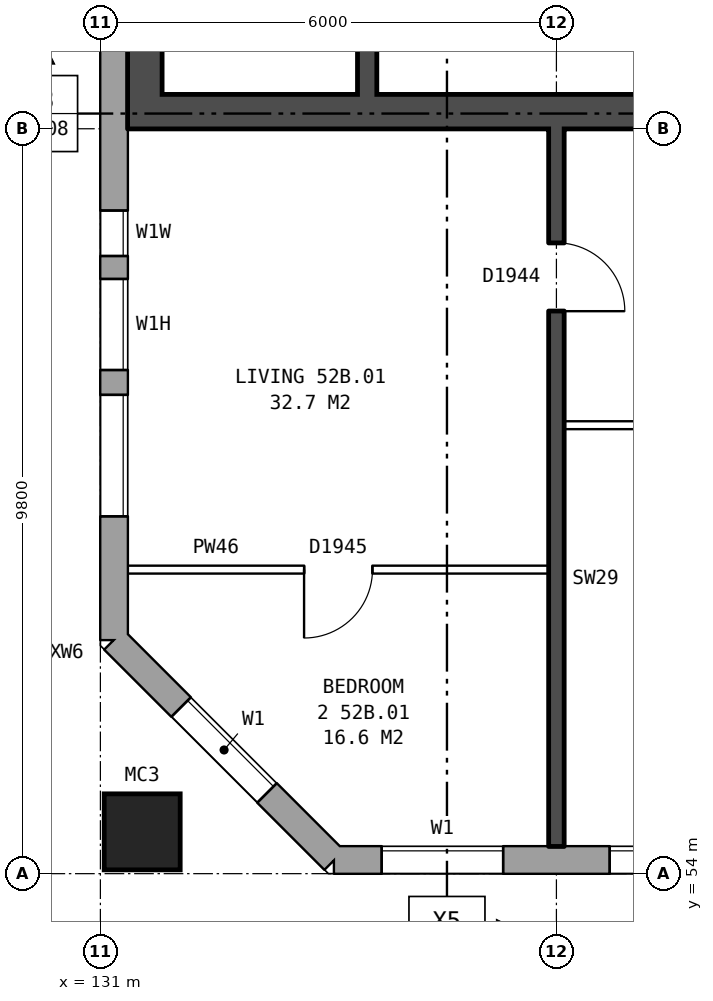
"""IFC4 building model, lengths in metres.
Left out: names, types, materials, properties, quantities, classifications, styles, units other than length and angle.
Written with IfcOpenShell. Run it as: python <this file> out.ifc"""

import sys

from ifc_helpers import new_model, si_unit, direction, frame, frame_2d, origin, origin_2d, place, context, subcontext, project, spatial, rectangle, hollow_rectangle, extrude, element, fill, save


model = new_model("IFC4")
c1 = context("Model", 3, precision=1e-05, world=origin(), true_north=direction((0.0, 1.0)))
c2 = subcontext(c1, "Body", "Model", "MODEL_VIEW")
j1 = project(units=[si_unit("LENGTHUNIT", "METRE"), si_unit("PLANEANGLEUNIT", "RADIAN")], contexts=[c1])
p1 = place(None, origin())
s1 = spatial("IfcSite", under=j1, at=p1, CompositionType="ELEMENT")
p2 = place(p1, origin())
s2 = spatial("IfcBuilding", under=s1, at=p2, CompositionType="ELEMENT")
p3 = place(p2, frame((0.0, 0.0, 185.1)))
s3 = spatial("IfcBuildingStorey", under=s2, at=p3, CompositionType="ELEMENT", Elevation=185.1)
p4 = place(p3, frame((131.55, 54.55, 0.0), z_axis=(0.0, 0.0, 1.0), x_axis=(1.0, 0.0, 0.0)))
e1 = element("IfcColumn", 1, at=p4, inside=s3, PredefinedType="COLUMN", context=c2, shape_type="SweptSolid", body=[
    extrude(hollow_rectangle(XDim=1.0, YDim=1.0, WallThickness=0.055, at=origin_2d()), origin(), (0.0, 0.0, 1.0), 3.1),
])
p5 = place(p3, frame((131.18, 57.075, 0.0), z_axis=(0.0, 0.0, 1.0), x_axis=(0.707106781187, -0.707106781187, 0.0)))
e2 = element("IfcWall", 2, at=p5, inside=s3, PredefinedType="STANDARD", context=c2, shape_type="SweptSolid", body=[
    extrude(rectangle(XDim=4.094, YDim=0.36, at=frame_2d((2.047, 0.0))), origin(), (0.0, 0.0, 1.0), 2.85),
])
p6 = place(p5, frame((1.247, 0.0, 0.8)))
e3 = element("IfcOpeningElement", 3, at=p6, cuts=e2, PredefinedType="OPENING", context=c2, shape_type="SweptSolid", body=[
    extrude(rectangle(XDim=1.6, YDim=1.8, at=frame_2d((0.8, 0.9))), frame((0.0, 0.19, 0.0), z_axis=(0.0, -1.0, 0.0), x_axis=(1.0, 0.0, 0.0)), (0.0, 0.0, 1.0), 0.38),
])
p7 = place(p3, frame((134.075, 54.18, 0.0), z_axis=(0.0, 0.0, 1.0), x_axis=(1.0, 0.0, 0.0)))
e4 = element("IfcWall", 4, at=p7, inside=s3, PredefinedType="STANDARD", context=c2, shape_type="SweptSolid", body=[
    extrude(rectangle(XDim=33.101, YDim=0.36, at=frame_2d((16.55, 0.0))), origin(), (0.0, 0.0, 1.0), 2.85),
])
p8 = place(p7, frame((0.625, 0.0, 0.8)))
e5 = element("IfcOpeningElement", 5, at=p8, cuts=e4, PredefinedType="OPENING", context=c2, shape_type="SweptSolid", body=[
    extrude(rectangle(XDim=1.6, YDim=1.8, at=frame_2d((0.8, 0.9))), frame((0.0, 0.19, 0.0), z_axis=(0.0, -1.0, 0.0), x_axis=(1.0, 0.0, 0.0)), (0.0, 0.0, 1.0), 0.38),
])
p9 = place(p7, frame((3.625, 0.0, 0.8)))
e6 = element("IfcOpeningElement", 6, at=p9, cuts=e4, PredefinedType="OPENING", context=c2, shape_type="SweptSolid", body=[
    extrude(rectangle(XDim=1.6, YDim=1.8, at=frame_2d((0.8, 0.9))), frame((0.0, 0.19, 0.0), z_axis=(0.0, -1.0, 0.0), x_axis=(1.0, 0.0, 0.0)), (0.0, 0.0, 1.0), 0.38),
])
p10 = place(p7, frame((6.625, 0.0, 0.8)))
e7 = element("IfcOpeningElement", 7, at=p10, cuts=e4, PredefinedType="OPENING", context=c2, shape_type="SweptSolid", body=[
    extrude(rectangle(XDim=1.6, YDim=1.8, at=frame_2d((0.8, 0.9))), frame((0.0, 0.19, 0.0), z_axis=(0.0, -1.0, 0.0), x_axis=(1.0, 0.0, 0.0)), (0.0, 0.0, 1.0), 0.38),
])
p11 = place(p7, frame((9.125, 0.0, 1.65)))
e8 = element("IfcOpeningElement", 8, at=p11, cuts=e4, PredefinedType="OPENING", context=c2, shape_type="SweptSolid", body=[
    extrude(rectangle(XDim=0.6, YDim=0.9, at=frame_2d((0.3, 0.45))), frame((0.0, 0.19, 0.0), z_axis=(0.0, -1.0, 0.0), x_axis=(1.0, 0.0, 0.0)), (0.0, 0.0, 1.0), 0.38),
])
p12 = place(p7, frame((12.625, 0.0, 0.8)))
e9 = element("IfcOpeningElement", 9, at=p12, cuts=e4, PredefinedType="OPENING", context=c2, shape_type="SweptSolid", body=[
    extrude(rectangle(XDim=1.6, YDim=1.8, at=frame_2d((0.8, 0.9))), frame((0.0, 0.19, 0.0), z_axis=(0.0, -1.0, 0.0), x_axis=(1.0, 0.0, 0.0)), (0.0, 0.0, 1.0), 0.38),
])
p13 = place(p7, frame((15.625, 0.0, 0.8)))
e10 = element("IfcOpeningElement", 10, at=p13, cuts=e4, PredefinedType="OPENING", context=c2, shape_type="SweptSolid", body=[
    extrude(rectangle(XDim=1.6, YDim=1.8, at=frame_2d((0.8, 0.9))), frame((0.0, 0.19, 0.0), z_axis=(0.0, -1.0, 0.0), x_axis=(1.0, 0.0, 0.0)), (0.0, 0.0, 1.0), 0.38),
])
p14 = place(p7, frame((18.625, 0.0, 0.8)))
e11 = element("IfcOpeningElement", 11, at=p14, cuts=e4, PredefinedType="OPENING", context=c2, shape_type="SweptSolid", body=[
    extrude(rectangle(XDim=1.6, YDim=1.8, at=frame_2d((0.8, 0.9))), frame((0.0, 0.19, 0.0), z_axis=(0.0, -1.0, 0.0), x_axis=(1.0, 0.0, 0.0)), (0.0, 0.0, 1.0), 0.38),
])
p15 = place(p7, frame((21.125, 0.0, 0.8)))
e12 = element("IfcOpeningElement", 12, at=p15, cuts=e4, PredefinedType="OPENING", context=c2, shape_type="SweptSolid", body=[
    extrude(rectangle(XDim=0.8, YDim=1.2, at=frame_2d((0.4, 0.6))), frame((0.0, 0.19, 0.0), z_axis=(0.0, -1.0, 0.0), x_axis=(1.0, 0.0, 0.0)), (0.0, 0.0, 1.0), 0.38),
])
p16 = place(p7, frame((24.625, 0.0, 0.8)))
e13 = element("IfcOpeningElement", 13, at=p16, cuts=e4, PredefinedType="OPENING", context=c2, shape_type="SweptSolid", body=[
    extrude(rectangle(XDim=1.6, YDim=1.8, at=frame_2d((0.8, 0.9))), frame((0.0, 0.19, 0.0), z_axis=(0.0, -1.0, 0.0), x_axis=(1.0, 0.0, 0.0)), (0.0, 0.0, 1.0), 0.38),
])
p17 = place(p7, frame((27.625, 0.0, 0.8)))
e14 = element("IfcOpeningElement", 14, at=p17, cuts=e4, PredefinedType="OPENING", context=c2, shape_type="SweptSolid", body=[
    extrude(rectangle(XDim=1.6, YDim=1.8, at=frame_2d((0.8, 0.9))), frame((0.0, 0.19, 0.0), z_axis=(0.0, -1.0, 0.0), x_axis=(1.0, 0.0, 0.0)), (0.0, 0.0, 1.0), 0.38),
])
p18 = place(p7, frame((30.625, 0.0, 0.8)))
e15 = element("IfcOpeningElement", 15, at=p18, cuts=e4, PredefinedType="OPENING", context=c2, shape_type="SweptSolid", body=[
    extrude(rectangle(XDim=1.6, YDim=1.8, at=frame_2d((0.8, 0.9))), frame((0.0, 0.19, 0.0), z_axis=(0.0, -1.0, 0.0), x_axis=(1.0, 0.0, 0.0)), (0.0, 0.0, 1.0), 0.38),
])
p19 = place(p7, frame((10.725, 0.0, 0.35)))
e16 = element("IfcOpeningElement", 16, at=p19, cuts=e4, PredefinedType="OPENING", context=c2, shape_type="SweptSolid", body=[
    extrude(rectangle(XDim=1.0, YDim=1.2, at=frame_2d((0.5, 0.6))), frame((0.0, 0.19, 0.0), z_axis=(0.0, -1.0, 0.0), x_axis=(1.0, 0.0, 0.0)), (0.0, 0.0, 1.0), 0.38),
])
p20 = place(p7, frame((23.525, 0.0, 1.4)))
e17 = element("IfcOpeningElement", 17, at=p20, cuts=e4, PredefinedType="OPENING", context=c2, shape_type="SweptSolid", body=[
    extrude(rectangle(XDim=0.8, YDim=1.2, at=frame_2d((0.4, 0.6))), frame((0.0, 0.19, 0.0), z_axis=(0.0, -1.0, 0.0), x_axis=(1.0, 0.0, 0.0)), (0.0, 0.0, 1.0), 0.38),
])
p21 = place(p3, frame((131.18, 82.925, 0.0), z_axis=(0.0, 0.0, 1.0), x_axis=(0.0, -1.0, 0.0)))
e18 = element("IfcWall", 18, at=p21, inside=s3, PredefinedType="STANDARD", context=c2, shape_type="SweptSolid", body=[
    extrude(rectangle(XDim=25.851, YDim=0.36, at=frame_2d((12.925, 0.0))), origin(), (0.0, 0.0, 1.0), 2.85),
])
p22 = place(p21, frame((1.625, 0.0, 0.8)))
e19 = element("IfcOpeningElement", 19, at=p22, cuts=e18, PredefinedType="OPENING", context=c2, shape_type="SweptSolid", body=[
    extrude(rectangle(XDim=1.6, YDim=1.8, at=frame_2d((0.8, 0.9))), frame((0.0, 0.19, 0.0), z_axis=(0.0, -1.0, 0.0), x_axis=(1.0, 0.0, 0.0)), (0.0, 0.0, 1.0), 0.38),
])
p23 = place(p21, frame((3.525, 0.0, 0.8)))
e20 = element("IfcOpeningElement", 20, at=p23, cuts=e18, PredefinedType="OPENING", context=c2, shape_type="SweptSolid", body=[
    extrude(rectangle(XDim=0.8, YDim=1.8, at=frame_2d((0.4, 0.9))), frame((0.0, 0.19, 0.0), z_axis=(0.0, -1.0, 0.0), x_axis=(1.0, 0.0, 0.0)), (0.0, 0.0, 1.0), 0.38),
])
p24 = place(p21, frame((20.2, 0.0, 0.8)))
e21 = element("IfcOpeningElement", 21, at=p24, cuts=e18, PredefinedType="OPENING", context=c2, shape_type="SweptSolid", body=[
    extrude(rectangle(XDim=0.6, YDim=0.9, at=frame_2d((0.3, 0.45))), frame((0.0, 0.19, 0.0), z_axis=(0.0, -1.0, 0.0), x_axis=(1.0, 0.0, 0.0)), (0.0, 0.0, 1.0), 0.38),
])
p25 = place(p21, frame((22.625, 0.0, 0.8)))
e22 = element("IfcOpeningElement", 22, at=p25, cuts=e18, PredefinedType="OPENING", context=c2, shape_type="SweptSolid", body=[
    extrude(rectangle(XDim=1.6, YDim=1.8, at=frame_2d((0.8, 0.9))), frame((0.0, 0.19, 0.0), z_axis=(0.0, -1.0, 0.0), x_axis=(1.0, 0.0, 0.0)), (0.0, 0.0, 1.0), 0.38),
])
p26 = place(p21, frame((4.625, 0.0, 0.8)))
e23 = element("IfcOpeningElement", 23, at=p26, cuts=e18, PredefinedType="OPENING", context=c2, shape_type="SweptSolid", body=[
    extrude(rectangle(XDim=1.0, YDim=0.9, at=frame_2d((0.5, 0.45))), frame((0.0, 0.19, 0.0), z_axis=(0.0, -1.0, 0.0), x_axis=(1.0, 0.0, 0.0)), (0.0, 0.0, 1.0), 0.38),
])
p27 = place(p21, frame((21.1, 0.0, 0.8)))
e24 = element("IfcOpeningElement", 24, at=p27, cuts=e18, PredefinedType="OPENING", context=c2, shape_type="SweptSolid", body=[
    extrude(rectangle(XDim=1.2, YDim=1.5, at=frame_2d((0.6, 0.75))), frame((0.0, 0.19, 0.0), z_axis=(0.0, -1.0, 0.0), x_axis=(1.0, 0.0, 0.0)), (0.0, 0.0, 1.0), 0.38),
])
p28 = place(p3, frame((131.585, 63.8, 0.0), z_axis=(0.0, 0.0, 1.0), x_axis=(0.0, 1.0, 0.0)))
e25 = element("IfcWall", 25, at=p28, inside=s3, PredefinedType="SHEAR", context=c2, shape_type="SweptSolid", body=[
    extrude(rectangle(XDim=12.4, YDim=0.45, at=frame_2d((6.2, 0.0))), origin(), (0.0, 0.0, 1.0), 2.85),
])
p29 = place(p3, frame((139.31, 64.025, 0.0), z_axis=(0.0, 0.0, 1.0), x_axis=(-1.0, 0.0, 0.0)))
e26 = element("IfcWall", 26, at=p29, inside=s3, PredefinedType="SHEAR", context=c2, shape_type="SweptSolid", body=[
    extrude(rectangle(XDim=7.5, YDim=0.45, at=frame_2d((3.75, 0.0))), origin(), (0.0, 0.0, 1.0), 2.85),
])
p30 = place(p3, frame((134.51, 64.25, 0.0), z_axis=(0.0, 0.0, 1.0), x_axis=(0.0, 1.0, 0.0)))
e27 = element("IfcWall", 27, at=p30, inside=s3, PredefinedType="SHEAR", context=c2, shape_type="SweptSolid", body=[
    extrude(rectangle(XDim=6.875, YDim=0.25, at=frame_2d((3.438, 0.0))), origin(), (0.0, 0.0, 1.0), 2.85),
])
p31 = place(p3, frame((131.36, 58.0, 0.0), z_axis=(0.0, 0.0, 1.0), x_axis=(1.0, 0.0, 0.0)))
e28 = element("IfcWall", 28, at=p31, inside=s3, PredefinedType="PARTITIONING", context=c2, shape_type="SweptSolid", body=[
    extrude(rectangle(XDim=5.54, YDim=0.1, at=frame_2d((2.77, 0.0))), origin(), (0.0, 0.0, 1.0), 2.85),
])
p32 = place(p31, frame((2.32, 0.0, 0.0)))
e29 = element("IfcOpeningElement", 29, at=p32, cuts=e28, PredefinedType="OPENING", context=c2, shape_type="SweptSolid", body=[
    extrude(rectangle(XDim=0.9, YDim=2.1, at=frame_2d((0.45, 1.05))), frame((0.0, 0.06, 0.0), z_axis=(0.0, -1.0, 0.0), x_axis=(1.0, 0.0, 0.0)), (0.0, 0.0, 1.0), 0.12),
])
p33 = place(p3, frame((137.1, 59.9, 0.0), z_axis=(0.0, 0.0, 1.0), x_axis=(1.0, 0.0, 0.0)))
e30 = element("IfcWall", 30, at=p33, inside=s3, PredefinedType="PARTITIONING", context=c2, shape_type="SweptSolid", body=[
    extrude(rectangle(XDim=5.8, YDim=0.1, at=frame_2d((2.9, 0.0))), origin(), (0.0, 0.0, 1.0), 2.85),
])
p34 = place(p33, frame((1.3, 0.0, 0.0)))
e31 = element("IfcOpeningElement", 31, at=p34, cuts=e30, PredefinedType="OPENING", context=c2, shape_type="SweptSolid", body=[
    extrude(rectangle(XDim=0.9, YDim=2.1, at=frame_2d((0.45, 1.05))), frame((0.0, 0.06, 0.0), z_axis=(0.0, -1.0, 0.0), x_axis=(1.0, 0.0, 0.0)), (0.0, 0.0, 1.0), 0.12),
])
p35 = place(p33, frame((4.2, 0.0, 0.0)))
e32 = element("IfcOpeningElement", 32, at=p35, cuts=e30, PredefinedType="OPENING", context=c2, shape_type="SweptSolid", body=[
    extrude(rectangle(XDim=0.9, YDim=2.1, at=frame_2d((0.45, 1.05))), frame((0.0, 0.06, 0.0), z_axis=(0.0, -1.0, 0.0), x_axis=(1.0, 0.0, 0.0)), (0.0, 0.0, 1.0), 0.12),
])
p36 = place(p3, frame((137.0, 54.36, 0.0), z_axis=(0.0, 0.0, 1.0), x_axis=(0.0, 1.0, 0.0)))
e33 = element("IfcWall", 33, at=p36, inside=s3, PredefinedType="SOLIDWALL", context=c2, shape_type="SweptSolid", body=[
    extrude(rectangle(XDim=9.44, YDim=0.2, at=frame_2d((4.72, 0.0))), origin(), (0.0, 0.0, 1.0), 2.85),
])
p37 = place(p36, frame((7.04, 0.0, 0.0)))
e34 = element("IfcOpeningElement", 34, at=p37, cuts=e33, PredefinedType="OPENING", context=c2, shape_type="SweptSolid", body=[
    extrude(rectangle(XDim=0.9, YDim=2.1, at=frame_2d((0.45, 1.05))), frame((0.0, 0.11, 0.0), z_axis=(0.0, -1.0, 0.0), x_axis=(1.0, 0.0, 0.0)), (0.0, 0.0, 1.0), 0.22),
])
p38 = place(p6, origin())
e35 = element("IfcWindow", 35, at=p38, inside=s3, PartitioningType="SINGLE_PANEL", PredefinedType="WINDOW", context=c2, shape_type="SweptSolid", body=[
    extrude(rectangle(XDim=1.6, YDim=1.8, at=frame_2d((0.8, 0.9))), frame((0.0, 0.15, 0.0), z_axis=(0.0, -1.0, 0.0), x_axis=(1.0, 0.0, 0.0)), (0.0, 0.0, 1.0), 0.06),
])
fill(e3, e35)
p39 = place(p8, origin())
e36 = element("IfcWindow", 36, at=p39, inside=s3, PartitioningType="SINGLE_PANEL", PredefinedType="WINDOW", context=c2, shape_type="SweptSolid", body=[
    extrude(rectangle(XDim=1.6, YDim=1.8, at=frame_2d((0.8, 0.9))), frame((0.0, 0.15, 0.0), z_axis=(0.0, -1.0, 0.0), x_axis=(1.0, 0.0, 0.0)), (0.0, 0.0, 1.0), 0.06),
])
fill(e5, e36)
p40 = place(p9, origin())
e37 = element("IfcWindow", 37, at=p40, inside=s3, PartitioningType="SINGLE_PANEL", PredefinedType="WINDOW", context=c2, shape_type="SweptSolid", body=[
    extrude(rectangle(XDim=1.6, YDim=1.8, at=frame_2d((0.8, 0.9))), frame((0.0, 0.15, 0.0), z_axis=(0.0, -1.0, 0.0), x_axis=(1.0, 0.0, 0.0)), (0.0, 0.0, 1.0), 0.06),
])
fill(e6, e37)
p41 = place(p24, origin())
e38 = element("IfcWindow", 38, at=p41, inside=s3, PartitioningType="SINGLE_PANEL", PredefinedType="WINDOW", context=c2, shape_type="SweptSolid", body=[
    extrude(rectangle(XDim=0.6, YDim=0.9, at=frame_2d((0.3, 0.45))), frame((0.0, 0.15, 0.0), z_axis=(0.0, -1.0, 0.0), x_axis=(1.0, 0.0, 0.0)), (0.0, 0.0, 1.0), 0.06),
])
fill(e21, e38)
p42 = place(p25, origin())
e39 = element("IfcWindow", 39, at=p42, inside=s3, PartitioningType="SINGLE_PANEL", PredefinedType="WINDOW", context=c2, shape_type="SweptSolid", body=[
    extrude(rectangle(XDim=1.6, YDim=1.8, at=frame_2d((0.8, 0.9))), frame((0.0, 0.15, 0.0), z_axis=(0.0, -1.0, 0.0), x_axis=(1.0, 0.0, 0.0)), (0.0, 0.0, 1.0), 0.06),
])
fill(e22, e39)
p43 = place(p32, frame((0.9, 0.0, 0.0), z_axis=(0.0, 0.0, 1.0), x_axis=(-1.0, 0.0, 0.0)))
e40 = element("IfcDoor", 40, at=p43, inside=s3, OperationType="SINGLE_SWING_RIGHT", PredefinedType="DOOR", context=c2, shape_type="SweptSolid", body=[
    extrude(rectangle(XDim=0.9, YDim=2.1, at=frame_2d((0.45, 1.05))), frame((0.0, 0.025, 0.0), z_axis=(0.0, -1.0, 0.0), x_axis=(1.0, 0.0, 0.0)), (0.0, 0.0, 1.0), 0.05),
])
fill(e29, e40)
p44 = place(p37, frame((0.9, 0.0, 0.0), z_axis=(0.0, 0.0, 1.0), x_axis=(-1.0, 0.0, 0.0)))
e41 = element("IfcDoor", 41, at=p44, inside=s3, OperationType="SINGLE_SWING_RIGHT", PredefinedType="DOOR", context=c2, shape_type="SweptSolid", body=[
    extrude(rectangle(XDim=0.9, YDim=2.1, at=frame_2d((0.45, 1.05))), frame((0.0, 0.025, 0.0), z_axis=(0.0, -1.0, 0.0), x_axis=(1.0, 0.0, 0.0)), (0.0, 0.0, 1.0), 0.05),
])
fill(e34, e41)
p45 = place(p27, origin())
e42 = element("IfcWindow", 42, at=p45, inside=s3, PartitioningType="SINGLE_PANEL", PredefinedType="WINDOW", context=c2, shape_type="SweptSolid", body=[
    extrude(rectangle(XDim=1.2, YDim=1.5, at=frame_2d((0.6, 0.75))), frame((0.0, 0.15, 0.0), z_axis=(0.0, -1.0, 0.0), x_axis=(1.0, 0.0, 0.0)), (0.0, 0.0, 1.0), 0.06),
])
fill(e24, e42)
save(model, sys.argv[1])
